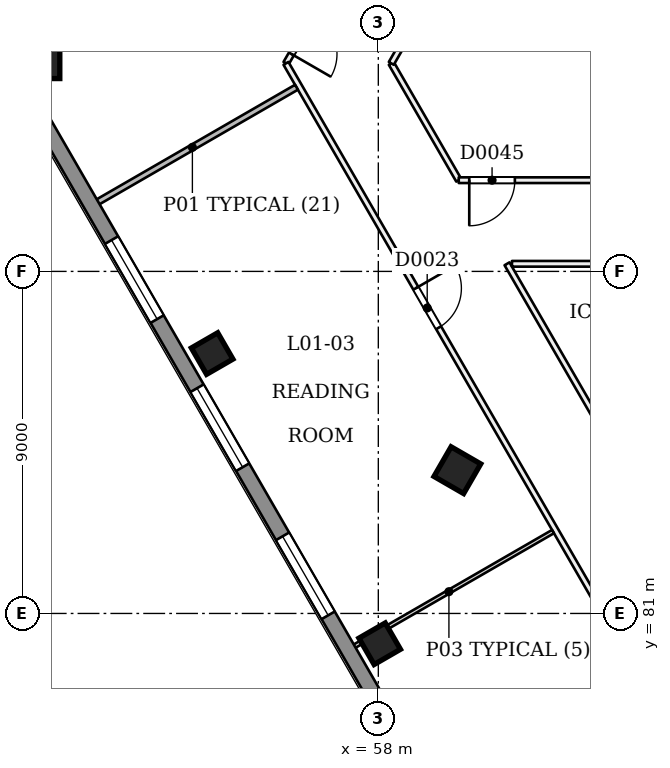
"""IFC4 building model, lengths in metres.
Left out: names, types, materials, properties, quantities, classifications, styles, units other than length and angle.
Written with IfcOpenShell. Run it as: python <this file> out.ifc"""

import sys

from ifc_helpers import new_model, si_unit, direction, frame, frame_2d, origin, origin_2d, place, context, subcontext, project, spatial, rectangle, extrude, element, fill, save


model = new_model("IFC4")
c1 = context("Model", 3, precision=1e-05, world=origin(), true_north=direction((0.0, 1.0)))
c2 = subcontext(c1, "Body", "Model", "MODEL_VIEW")
j1 = project(units=[si_unit("LENGTHUNIT", "METRE"), si_unit("PLANEANGLEUNIT", "RADIAN")], contexts=[c1])
p1 = place(None, origin())
s1 = spatial("IfcSite", under=j1, at=p1, CompositionType="ELEMENT")
p2 = place(p1, origin())
s2 = spatial("IfcBuilding", under=s1, at=p2, CompositionType="ELEMENT")
p3 = place(p2, frame((0.0, 0.0, 9.0)))
s3 = spatial("IfcBuildingStorey", under=s2, at=p3, CompositionType="ELEMENT", Elevation=9.0)
p4 = place(p3, frame((60.053, 84.723, -0.027), z_axis=(0.022167823514, 0.038427840761, 0.999015459668), x_axis=(-0.865417110463, -0.49957695697, 0.038419903465)))
e1 = element("IfcColumn", 1, at=p4, inside=s3, PredefinedType="COLUMN", context=c2, shape_type="SweptSolid", body=[
    extrude(rectangle(XDim=0.9, YDim=0.9, at=origin_2d()), origin(), (0.0, 0.0, 1.0), 4.504),
])
for number, where, z_axis, x_axis in (
    (2, (49.219, 95.474, 0.0), (0.0, 0.0, 1.0), (1.0, 1.745e-08, 0.0)),
    (3, (53.628, 87.838, 0.0), (0.0, 0.0, 1.0), (0.866, 0.5, 0.0)),
    (4, (58.036, 80.203, 0.0), (0.0, 0.0, 1.0), (0.866, 0.5, 0.0)),
):
    element("IfcColumn", number, at=place(p3, frame(where, z_axis=z_axis, x_axis=x_axis)), inside=s3, PredefinedType="COLUMN", context=c2, shape_type="SweptSolid", body=[
        extrude(rectangle(XDim=0.8, YDim=0.8, at=origin_2d()), origin(), (0.0, 0.0, 1.0), 4.5),
    ])
p5 = place(p3, frame((57.318, 98.5, 0.0), z_axis=(0.0, 0.0, 1.0), x_axis=(-0.500008701212, -0.866020380079, 0.0)))
e5 = element("IfcWall", 5, at=p5, inside=s3, PredefinedType="PARTITIONING", context=c2, shape_type="SweptSolid", body=[
    extrude(rectangle(XDim=3.495, YDim=0.15, at=frame_2d((1.747, 0.0))), origin(), (0.0, 0.0, 1.0), 4.05),
])
p6 = place(p5, frame((2.009, 0.0, 0.0)))
e6 = element("IfcOpeningElement", 6, at=p6, cuts=e5, PredefinedType="OPENING", context=c2, shape_type="SweptSolid", body=[
    extrude(rectangle(XDim=1.2, YDim=2.1, at=frame_2d((0.6, 1.05))), frame((0.0, 0.085, 0.0), z_axis=(0.0, -1.0, 0.0), x_axis=(1.0, 0.0, 0.0)), (0.0, 0.0, 1.0), 0.171),
])
p7 = place(p3, frame((55.57, 95.474, 0.0), z_axis=(0.0, 0.0, 1.0), x_axis=(0.500000085768, -0.866025354266, 0.0)))
e7 = element("IfcWall", 7, at=p7, inside=s3, PredefinedType="PARTITIONING", context=c2, shape_type="SweptSolid", body=[
    extrude(rectangle(XDim=55.365, YDim=0.15, at=frame_2d((27.682, 0.0))), origin(), (0.0, 0.0, 1.0), 4.05),
])
p8 = place(p7, frame((6.832, 0.0, 0.0)))
e8 = element("IfcOpeningElement", 8, at=p8, cuts=e7, PredefinedType="OPENING", context=c2, shape_type="SweptSolid", body=[
    extrude(rectangle(XDim=1.2, YDim=2.1, at=frame_2d((0.6, 1.05))), frame((0.0, 0.085, 0.0), z_axis=(0.0, -1.0, 0.0), x_axis=(1.0, 0.0, 0.0)), (0.0, 0.0, 1.0), 0.171),
])
p9 = place(p7, frame((18.182, 0.0, 0.0)))
e9 = element("IfcOpeningElement", 9, at=p9, cuts=e7, PredefinedType="OPENING", context=c2, shape_type="SweptSolid", body=[
    extrude(rectangle(XDim=1.0, YDim=2.1, at=frame_2d((0.5, 1.05))), frame((0.0, 0.085, 0.0), z_axis=(0.0, -1.0, 0.0), x_axis=(1.0, 0.0, 0.0)), (0.0, 0.0, 1.0), 0.171),
])
p10 = place(p7, frame((30.132, 0.0, 0.0)))
e10 = element("IfcOpeningElement", 10, at=p10, cuts=e7, PredefinedType="OPENING", context=c2, shape_type="SweptSolid", body=[
    extrude(rectangle(XDim=1.2, YDim=2.1, at=frame_2d((0.6, 1.05))), frame((0.0, 0.085, 0.0), z_axis=(0.0, -1.0, 0.0), x_axis=(1.0, 0.0, 0.0)), (0.0, 0.0, 1.0), 0.171),
])
p11 = place(p7, frame((40.582, 0.0, 0.0)))
e11 = element("IfcOpeningElement", 11, at=p11, cuts=e7, PredefinedType="OPENING", context=c2, shape_type="SweptSolid", body=[
    extrude(rectangle(XDim=1.2, YDim=2.1, at=frame_2d((0.6, 1.05))), frame((0.0, 0.085, 0.0), z_axis=(0.0, -1.0, 0.0), x_axis=(1.0, 0.0, 0.0)), (0.0, 0.0, 1.0), 0.171),
])
p12 = place(p7, frame((46.315, 0.0, 0.0)))
e12 = element("IfcOpeningElement", 12, at=p12, cuts=e7, PredefinedType="OPENING", context=c2, shape_type="SweptSolid", body=[
    extrude(rectangle(XDim=0.9, YDim=2.1, at=frame_2d((0.45, 1.05))), frame((0.0, 0.085, 0.0), z_axis=(0.0, -1.0, 0.0), x_axis=(1.0, 0.0, 0.0)), (0.0, 0.0, 1.0), 0.171),
])
p13 = place(p7, frame((48.565, 0.0, 0.0)))
e13 = element("IfcOpeningElement", 13, at=p13, cuts=e7, PredefinedType="OPENING", context=c2, shape_type="SweptSolid", body=[
    extrude(rectangle(XDim=0.9, YDim=2.1, at=frame_2d((0.45, 1.05))), frame((0.0, 0.085, 0.0), z_axis=(0.0, -1.0, 0.0), x_axis=(1.0, 0.0, 0.0)), (0.0, 0.0, 1.0), 0.171),
])
p14 = place(p7, frame((53.195, 0.0, 0.0)))
e14 = element("IfcOpeningElement", 14, at=p14, cuts=e7, PredefinedType="OPENING", context=c2, shape_type="SweptSolid", body=[
    extrude(rectangle(XDim=1.2, YDim=2.1, at=frame_2d((0.6, 1.05))), frame((0.0, 0.085, 0.0), z_axis=(0.0, -1.0, 0.0), x_axis=(1.0, 0.0, 0.0)), (0.0, 0.0, 1.0), 0.171),
])
p15 = place(p3, frame((77.321, 62.6, 0.0), z_axis=(0.0, 0.0, 1.0), x_axis=(-0.500000743568, 0.866024974485, 0.0)))
e15 = element("IfcWall", 15, at=p15, inside=s3, PredefinedType="PARTITIONING", context=c2, shape_type="SweptSolid", body=[
    extrude(rectangle(XDim=31.87, YDim=0.15, at=frame_2d((15.935, 0.0))), origin(), (0.0, 0.0, 1.0), 4.05),
])
p16 = place(p15, frame((19.989, 0.0, 0.0)))
e16 = element("IfcOpeningElement", 16, at=p16, cuts=e15, PredefinedType="OPENING", context=c2, shape_type="SweptSolid", body=[
    extrude(rectangle(XDim=1.2, YDim=2.1, at=frame_2d((0.6, 1.05))), frame((0.0, 0.085, 0.0), z_axis=(0.0, -1.0, 0.0), x_axis=(1.0, 0.0, 0.0)), (0.0, 0.0, 1.0), 0.171),
])
p17 = place(p15, frame((5.035, 0.0, 0.0)))
e17 = element("IfcOpeningElement", 17, at=p17, cuts=e15, PredefinedType="OPENING", context=c2, shape_type="SweptSolid", body=[
    extrude(rectangle(XDim=1.2, YDim=2.1, at=frame_2d((0.6, 1.05))), frame((0.0, 0.085, 0.0), z_axis=(0.0, -1.0, 0.0), x_axis=(1.0, 0.0, 0.0)), (0.0, 0.0, 1.0), 0.171),
])
p18 = place(p3, frame((61.516, 90.2, 0.0), z_axis=(0.0, 0.0, 1.0), x_axis=(1.0, 0.0, 0.0)))
e18 = element("IfcWall", 18, at=p18, inside=s3, PredefinedType="PARTITIONING", context=c2, shape_type="SweptSolid", body=[
    extrude(rectangle(XDim=16.884, YDim=0.15, at=frame_2d((8.442, 0.0))), origin(), (0.0, 0.0, 1.0), 4.05),
])
p19 = place(p18, frame((15.062, 0.0, 0.0)))
e19 = element("IfcOpeningElement", 19, at=p19, cuts=e18, PredefinedType="OPENING", context=c2, shape_type="SweptSolid", body=[
    extrude(rectangle(XDim=1.2, YDim=2.1, at=frame_2d((0.6, 1.05))), frame((0.0, 0.085, 0.0), z_axis=(0.0, -1.0, 0.0), x_axis=(1.0, 0.0, 0.0)), (0.0, 0.0, 1.0), 0.171),
])
p20 = place(p3, frame((60.116, 92.4, 0.0), z_axis=(0.0, 0.0, 1.0), x_axis=(-0.500008260065, 0.866020634781, 0.0)))
e20 = element("IfcWall", 20, at=p20, inside=s3, PredefinedType="PARTITIONING", context=c2, shape_type="SweptSolid", body=[
    extrude(rectangle(XDim=3.549, YDim=0.15, at=frame_2d((1.775, 0.0))), origin(), (0.0, 0.0, 1.0), 4.05),
])
p21 = place(p3, frame((58.342, 95.474, 0.0), z_axis=(0.0, 0.0, 1.0), x_axis=(0.500008701212, 0.866020380079, 0.0)))
e21 = element("IfcWall", 21, at=p21, inside=s3, PredefinedType="PARTITIONING", context=c2, shape_type="SweptSolid", body=[
    extrude(rectangle(XDim=3.495, YDim=0.15, at=frame_2d((1.747, 0.0))), origin(), (0.0, 0.0, 1.0), 4.05),
])
p22 = place(p3, frame((70.2, 92.4, 0.0), z_axis=(0.0, 0.0, 1.0), x_axis=(-1.0, 0.0, 0.0)))
e22 = element("IfcWall", 22, at=p22, inside=s3, PredefinedType="PARTITIONING", context=c2, shape_type="SweptSolid", body=[
    extrude(rectangle(XDim=10.084, YDim=0.15, at=frame_2d((5.042, 0.0))), origin(), (0.0, 0.0, 1.0), 4.05),
])
p23 = place(p22, frame((8.607, 0.0, 0.0)))
e23 = element("IfcOpeningElement", 23, at=p23, cuts=e22, PredefinedType="OPENING", context=c2, shape_type="SweptSolid", body=[
    extrude(rectangle(XDim=1.2, YDim=2.1, at=frame_2d((0.6, 1.05))), frame((0.0, 0.085, 0.0), z_axis=(0.0, -1.0, 0.0), x_axis=(1.0, 0.0, 0.0)), (0.0, 0.0, 1.0), 0.171),
])
p24 = place(p22, frame((1.762, 0.0, 0.0)))
e24 = element("IfcOpeningElement", 24, at=p24, cuts=e22, PredefinedType="OPENING", context=c2, shape_type="SweptSolid", body=[
    extrude(rectangle(XDim=1.2, YDim=2.1, at=frame_2d((0.6, 1.05))), frame((0.0, 0.085, 0.0), z_axis=(0.0, -1.0, 0.0), x_axis=(1.0, 0.0, 0.0)), (0.0, 0.0, 1.0), 0.171),
])
p25 = place(p3, frame((50.369, 91.683, 0.0), z_axis=(0.0, 0.0, 1.0), x_axis=(0.866025537322, 0.499999768706, 0.0)))
e25 = element("IfcWall", 25, at=p25, inside=s3, PredefinedType="PARTITIONING", context=c2, shape_type="SweptSolid", body=[
    extrude(rectangle(XDim=6.325, YDim=0.15, at=frame_2d((3.163, 0.0))), origin(), (0.0, 0.0, 1.0), 4.05),
])
p26 = place(p3, frame((57.119, 79.991, 0.0), z_axis=(0.0, 0.0, 1.0), x_axis=(0.866042250622, 0.499970819286, 0.0)))
e26 = element("IfcWall", 26, at=p26, inside=s3, PredefinedType="PARTITIONING", context=c2, shape_type="SweptSolid", body=[
    extrude(rectangle(XDim=6.325, YDim=0.1, at=frame_2d((3.163, 0.0))), origin(), (0.0, 0.0, 1.0), 4.05),
])
p27 = place(p3, frame((48.238, 95.374, 0.0), z_axis=(0.0, 0.0, 1.0), x_axis=(0.50000615651, 0.866021849293, 0.0)))
e27 = element("IfcWall", 27, at=p27, inside=s3, PredefinedType="SOLIDWALL", context=c2, shape_type="SweptSolid", body=[
    extrude(rectangle(XDim=11.0, YDim=0.4, at=frame_2d((5.5, 0.0))), origin(), (0.0, 0.0, 1.0), 4.05),
])
p28 = place(p3, frame((79.673, 41.126, 0.0), z_axis=(0.0, 0.0, 1.0), x_axis=(-0.499997306052, 0.866026959131, 0.0)))
e28 = element("IfcWall", 28, at=p28, inside=s3, PredefinedType="SOLIDWALL", context=c2, shape_type="SweptSolid", body=[
    extrude(rectangle(XDim=62.87, YDim=0.4, at=frame_2d((31.435, 0.0))), origin(), (0.0, 0.0, 1.0), 4.05),
])
p29 = place(p28, frame((54.986, 0.0, 0.9)))
e29 = element("IfcOpeningElement", 29, at=p29, cuts=e28, PredefinedType="OPENING", context=c2, shape_type="SweptSolid", body=[
    extrude(rectangle(XDim=2.4, YDim=1.5, at=frame_2d((1.2, 0.75))), frame((0.0, 0.21, 0.0), z_axis=(0.0, -1.0, 0.0), x_axis=(1.0, 0.0, 0.0)), (0.0, 0.0, 1.0), 0.421),
])
p30 = place(p28, frame((50.486, 0.0, 0.9)))
e30 = element("IfcOpeningElement", 30, at=p30, cuts=e28, PredefinedType="OPENING", context=c2, shape_type="SweptSolid", body=[
    extrude(rectangle(XDim=2.4, YDim=1.5, at=frame_2d((1.2, 0.75))), frame((0.0, 0.21, 0.0), z_axis=(0.0, -1.0, 0.0), x_axis=(1.0, 0.0, 0.0)), (0.0, 0.0, 1.0), 0.421),
])
p31 = place(p28, frame((45.986, 0.0, 0.9)))
e31 = element("IfcOpeningElement", 31, at=p31, cuts=e28, PredefinedType="OPENING", context=c2, shape_type="SweptSolid", body=[
    extrude(rectangle(XDim=2.4, YDim=1.5, at=frame_2d((1.2, 0.75))), frame((0.0, 0.21, 0.0), z_axis=(0.0, -1.0, 0.0), x_axis=(1.0, 0.0, 0.0)), (0.0, 0.0, 1.0), 0.421),
])
p32 = place(p28, frame((32.486, 0.0, 0.9)))
e32 = element("IfcOpeningElement", 32, at=p32, cuts=e28, PredefinedType="OPENING", context=c2, shape_type="SweptSolid", body=[
    extrude(rectangle(XDim=2.4, YDim=1.5, at=frame_2d((1.2, 0.75))), frame((0.0, 0.21, 0.0), z_axis=(0.0, -1.0, 0.0), x_axis=(1.0, 0.0, 0.0)), (0.0, 0.0, 1.0), 0.421),
])
p33 = place(p28, frame((27.986, 0.0, 0.9)))
e33 = element("IfcOpeningElement", 33, at=p33, cuts=e28, PredefinedType="OPENING", context=c2, shape_type="SweptSolid", body=[
    extrude(rectangle(XDim=2.4, YDim=1.5, at=frame_2d((1.2, 0.75))), frame((0.0, 0.21, 0.0), z_axis=(0.0, -1.0, 0.0), x_axis=(1.0, 0.0, 0.0)), (0.0, 0.0, 1.0), 0.421),
])
p34 = place(p28, frame((23.486, 0.0, 0.9)))
e34 = element("IfcOpeningElement", 34, at=p34, cuts=e28, PredefinedType="OPENING", context=c2, shape_type="SweptSolid", body=[
    extrude(rectangle(XDim=2.4, YDim=1.5, at=frame_2d((1.2, 0.75))), frame((0.0, 0.21, 0.0), z_axis=(0.0, -1.0, 0.0), x_axis=(1.0, 0.0, 0.0)), (0.0, 0.0, 1.0), 0.421),
])
p35 = place(p28, frame((18.986, 0.0, 0.9)))
e35 = element("IfcOpeningElement", 35, at=p35, cuts=e28, PredefinedType="OPENING", context=c2, shape_type="SweptSolid", body=[
    extrude(rectangle(XDim=2.4, YDim=1.5, at=frame_2d((1.2, 0.75))), frame((0.0, 0.21, 0.0), z_axis=(0.0, -1.0, 0.0), x_axis=(1.0, 0.0, 0.0)), (0.0, 0.0, 1.0), 0.421),
])
p36 = place(p28, frame((14.486, 0.0, 0.9)))
e36 = element("IfcOpeningElement", 36, at=p36, cuts=e28, PredefinedType="OPENING", context=c2, shape_type="SweptSolid", body=[
    extrude(rectangle(XDim=2.4, YDim=1.5, at=frame_2d((1.2, 0.75))), frame((0.0, 0.21, 0.0), z_axis=(0.0, -1.0, 0.0), x_axis=(1.0, 0.0, 0.0)), (0.0, 0.0, 1.0), 0.421),
])
p37 = place(p6, origin())
e37 = element("IfcDoor", 37, at=p37, inside=s3, OperationType="SINGLE_SWING_RIGHT", PredefinedType="NOTDEFINED", context=c2, shape_type="SweptSolid", body=[
    extrude(rectangle(XDim=1.2, YDim=2.1, at=frame_2d((0.6, 1.05))), frame((0.0, 0.025, 0.0), z_axis=(0.0, -1.0, 0.0), x_axis=(1.0, 0.0, 0.0)), (0.0, 0.0, 1.0), 0.05),
])
fill(e6, e37)
p38 = place(p8, origin())
e38 = element("IfcDoor", 38, at=p38, inside=s3, OperationType="SINGLE_SWING_LEFT", PredefinedType="NOTDEFINED", context=c2, shape_type="SweptSolid", body=[
    extrude(rectangle(XDim=1.2, YDim=2.1, at=frame_2d((0.6, 1.05))), frame((0.0, 0.025, 0.0), z_axis=(0.0, -1.0, 0.0), x_axis=(1.0, 0.0, 0.0)), (0.0, 0.0, 1.0), 0.05),
])
fill(e8, e38)
p39 = place(p23, origin())
e39 = element("IfcDoor", 39, at=p39, inside=s3, OperationType="SINGLE_SWING_RIGHT", PredefinedType="NOTDEFINED", context=c2, shape_type="SweptSolid", body=[
    extrude(rectangle(XDim=1.2, YDim=2.1, at=frame_2d((0.6, 1.05))), frame((0.0, 0.025, 0.0), z_axis=(0.0, -1.0, 0.0), x_axis=(1.0, 0.0, 0.0)), (0.0, 0.0, 1.0), 0.05),
])
fill(e23, e39)
p40 = place(p29, origin())
e40 = element("IfcWindow", 40, at=p40, inside=s3, PartitioningType="SINGLE_PANEL", PredefinedType="WINDOW", context=c2, shape_type="SweptSolid", body=[
    extrude(rectangle(XDim=2.4, YDim=1.5, at=frame_2d((1.2, 0.75))), frame((0.0, 0.03, 0.0), z_axis=(0.0, -1.0, 0.0), x_axis=(1.0, 0.0, 0.0)), (0.0, 0.0, 1.0), 0.06),
])
fill(e29, e40)
p41 = place(p30, origin())
e41 = element("IfcWindow", 41, at=p41, inside=s3, PartitioningType="SINGLE_PANEL", PredefinedType="WINDOW", context=c2, shape_type="SweptSolid", body=[
    extrude(rectangle(XDim=2.4, YDim=1.5, at=frame_2d((1.2, 0.75))), frame((0.0, 0.03, 0.0), z_axis=(0.0, -1.0, 0.0), x_axis=(1.0, 0.0, 0.0)), (0.0, 0.0, 1.0), 0.06),
])
fill(e30, e41)
p42 = place(p31, origin())
e42 = element("IfcWindow", 42, at=p42, inside=s3, PartitioningType="SINGLE_PANEL", PredefinedType="WINDOW", context=c2, shape_type="SweptSolid", body=[
    extrude(rectangle(XDim=2.4, YDim=1.5, at=frame_2d((1.2, 0.75))), frame((0.0, 0.03, 0.0), z_axis=(0.0, -1.0, 0.0), x_axis=(1.0, 0.0, 0.0)), (0.0, 0.0, 1.0), 0.06),
])
fill(e31, e42)
save(model, sys.argv[1])
